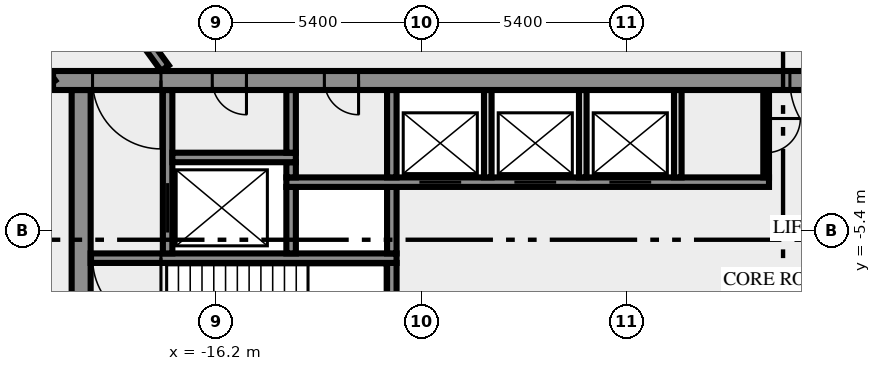
"""IFC4 building model, lengths in metres.
Left out: names, types, materials, properties, quantities, classifications, styles, units other than length and angle.
Written with IfcOpenShell. Run it as: python <this file> out.ifc"""

import sys

from ifc_helpers import new_model, si_unit, direction, frame, frame_2d, origin, place, context, subcontext, project, spatial, rectangle, extrude, element, fill, save


model = new_model("IFC4")
c1 = context("Model", 3, precision=1e-05, world=origin(), true_north=direction((0.0, 1.0)))
c2 = subcontext(c1, "Body", "Model", "MODEL_VIEW")
j1 = project(units=[si_unit("LENGTHUNIT", "METRE"), si_unit("PLANEANGLEUNIT", "RADIAN")], contexts=[c1])
p1 = place(None, origin())
s1 = spatial("IfcSite", under=j1, at=p1, CompositionType="ELEMENT")
p2 = place(p1, origin())
s2 = spatial("IfcBuilding", under=s1, at=p2, CompositionType="ELEMENT")
p3 = place(p2, frame((0.0, 0.0, 121.0)))
s3 = spatial("IfcBuildingStorey", under=s2, at=p3, CompositionType="ELEMENT", Elevation=121.0)
p4 = place(p3, frame((-19.75, -10.5, 0.0), z_axis=(0.0, 0.0, 1.0), x_axis=(0.0, 1.0, 0.0)))
e1 = element("IfcWall", 1, at=p4, inside=s3, PredefinedType="SHEAR", context=c2, shape_type="SweptSolid", body=[
    extrude(rectangle(XDim=8.8, YDim=0.5, at=frame_2d((4.4, 0.0))), origin(), (0.0, 0.0, 1.0), 3.65),
])
p5 = place(p3, frame((-11.575, -7.25, 0.0), z_axis=(0.0, 0.0, 1.0), x_axis=(0.0, 1.0, 0.0)))
e2 = element("IfcWall", 2, at=p5, inside=s3, PredefinedType="SHEAR", context=c2, shape_type="SweptSolid", body=[
    extrude(rectangle(XDim=1.0, YDim=0.25, at=frame_2d((0.5, 0.0))), origin(), (0.0, 0.0, 1.0), 3.65),
])
p6 = place(p3, frame((-11.45, -6.125, 0.0), z_axis=(0.0, 0.0, 1.0), x_axis=(-1.0, 0.0, 0.0)))
e3 = element("IfcWall", 3, at=p6, inside=s3, PredefinedType="SHEAR", context=c2, shape_type="SweptSolid", body=[
    extrude(rectangle(XDim=8.05, YDim=0.25, at=frame_2d((4.025, 0.0))), origin(), (0.0, 0.0, 1.0), 3.65),
])
p7 = place(p6, frame((6.2, 0.0, 0.0)))
e4 = element("IfcOpeningElement", 4, at=p7, cuts=e3, PredefinedType="OPENING", context=c2, shape_type="SweptSolid", body=[
    extrude(rectangle(XDim=1.8, YDim=2.1, at=frame_2d((0.9, 1.05))), frame((0.0, 0.135, 0.0), z_axis=(0.0, -1.0, 0.0), x_axis=(1.0, 0.0, 0.0)), (0.0, 0.0, 1.0), 0.27),
])
p8 = place(p3, frame((-17.475, -6.0, 0.0), z_axis=(0.0, 0.0, 1.0), x_axis=(0.0, 1.0, 0.0)))
e5 = element("IfcWall", 5, at=p8, inside=s3, PredefinedType="SHEAR", context=c2, shape_type="SweptSolid", body=[
    extrude(rectangle(XDim=4.3, YDim=0.25, at=frame_2d((2.15, 0.0))), origin(), (0.0, 0.0, 1.0), 3.65),
])
p9 = place(p8, frame((0.55, 0.0, 0.0)))
e6 = element("IfcOpeningElement", 6, at=p9, cuts=e5, PredefinedType="OPENING", context=c2, shape_type="SweptSolid", body=[
    extrude(rectangle(XDim=1.3, YDim=2.1, at=frame_2d((0.65, 1.05))), frame((0.0, 0.135, 0.0), z_axis=(0.0, -1.0, 0.0), x_axis=(1.0, 0.0, 0.0)), (0.0, 0.0, 1.0), 0.27),
])
for number, where, z_axis, x_axis in (
    (7, (-14.225, -6.0, 0.0), (0.0, 0.0, 1.0), (0.0, 1.0, 0.0)),
    (8, (-11.575, -6.0, 0.0), (0.0, 0.0, 1.0), (0.0, 1.0, 0.0)),
):
    element("IfcWall", number, at=place(p3, frame(where, z_axis=z_axis, x_axis=x_axis)), inside=s3, PredefinedType="SHEAR", context=c2, shape_type="SweptSolid", body=[
        extrude(rectangle(XDim=1.75, YDim=0.25, at=frame_2d((0.875, 0.0))), origin(), (0.0, 0.0, 1.0), 3.65),
    ])
p10 = place(p3, frame((-14.35, -4.125, 0.0), z_axis=(0.0, 0.0, 1.0), x_axis=(1.0, 0.0, 0.0)))
e9 = element("IfcWall", 9, at=p10, inside=s3, PredefinedType="SHEAR", context=c2, shape_type="SweptSolid", body=[
    extrude(rectangle(XDim=12.7, YDim=0.25, at=frame_2d((6.35, 0.0))), origin(), (0.0, 0.0, 1.0), 3.65),
])
p11 = place(p10, frame((3.5, 0.0, 0.0)))
e10 = element("IfcOpeningElement", 10, at=p11, cuts=e9, PredefinedType="OPENING", context=c2, shape_type="SweptSolid", body=[
    extrude(rectangle(XDim=1.1, YDim=2.1, at=frame_2d((0.55, 1.05))), frame((0.0, 0.135, 0.0), z_axis=(0.0, -1.0, 0.0), x_axis=(1.0, 0.0, 0.0)), (0.0, 0.0, 1.0), 0.27),
])
p12 = place(p10, frame((6.0, 0.0, 0.0)))
e11 = element("IfcOpeningElement", 11, at=p12, cuts=e9, PredefinedType="OPENING", context=c2, shape_type="SweptSolid", body=[
    extrude(rectangle(XDim=1.1, YDim=2.1, at=frame_2d((0.55, 1.05))), frame((0.0, 0.135, 0.0), z_axis=(0.0, -1.0, 0.0), x_axis=(1.0, 0.0, 0.0)), (0.0, 0.0, 1.0), 0.27),
])
p13 = place(p10, frame((8.5, 0.0, 0.0)))
e12 = element("IfcOpeningElement", 12, at=p13, cuts=e9, PredefinedType="OPENING", context=c2, shape_type="SweptSolid", body=[
    extrude(rectangle(XDim=1.1, YDim=2.1, at=frame_2d((0.55, 1.05))), frame((0.0, 0.135, 0.0), z_axis=(0.0, -1.0, 0.0), x_axis=(1.0, 0.0, 0.0)), (0.0, 0.0, 1.0), 0.27),
])
p14 = place(p3, frame((-14.225, -4.0, 0.0), z_axis=(0.0, 0.0, 1.0), x_axis=(0.0, 1.0, 0.0)))
e13 = element("IfcWall", 13, at=p14, inside=s3, PredefinedType="SHEAR", context=c2, shape_type="SweptSolid", body=[
    extrude(rectangle(XDim=0.4, YDim=0.25, at=frame_2d((0.2, 0.0))), origin(), (0.0, 0.0, 1.0), 3.65),
])
p15 = place(p3, frame((-11.575, -4.0, 0.0), z_axis=(0.0, 0.0, 1.0), x_axis=(0.0, 1.0, 0.0)))
e14 = element("IfcWall", 14, at=p15, inside=s3, PredefinedType="SHEAR", context=c2, shape_type="SweptSolid", body=[
    extrude(rectangle(XDim=2.3, YDim=0.25, at=frame_2d((1.15, 0.0))), origin(), (0.0, 0.0, 1.0), 3.65),
])
for number, where, z_axis, x_axis in (
    (15, (-9.05, -4.0, 0.0), (0.0, 0.0, 1.0), (0.0, 1.0, 0.0)),
    (16, (-6.55, -4.0, 0.0), (0.0, 0.0, 1.0), (0.0, 1.0, 0.0)),
    (17, (-4.05, -4.0, 0.0), (0.0, 0.0, 1.0), (0.0, 1.0, 0.0)),
):
    element("IfcWall", number, at=place(p3, frame(where, z_axis=z_axis, x_axis=x_axis)), inside=s3, PredefinedType="SOLIDWALL", context=c2, shape_type="SweptSolid", body=[
        extrude(rectangle(XDim=2.3, YDim=0.2, at=frame_2d((1.15, 0.0))), origin(), (0.0, 0.0, 1.0), 3.65),
    ])
p16 = place(p3, frame((-1.725, -1.7, 0.0), z_axis=(0.0, 0.0, 1.0), x_axis=(0.0, -1.0, 0.0)))
e18 = element("IfcWall", 18, at=p16, inside=s3, PredefinedType="PARTITIONING", context=c2, shape_type="SweptSolid", body=[
    extrude(rectangle(XDim=2.3, YDim=0.15, at=frame_2d((1.15, 0.0))), origin(), (0.0, 0.0, 1.0), 3.65),
])
p17 = place(p16, frame((0.75, 0.0, 0.0)))
e19 = element("IfcOpeningElement", 19, at=p17, cuts=e18, PredefinedType="OPENING", context=c2, shape_type="SweptSolid", body=[
    extrude(rectangle(XDim=0.9, YDim=2.1, at=frame_2d((0.45, 1.05))), frame((0.0, 0.085, 0.0), z_axis=(0.0, -1.0, 0.0), x_axis=(1.0, 0.0, 0.0)), (0.0, 0.0, 1.0), 0.17),
])
p18 = place(p3, frame((-17.35, -3.475, 0.0), z_axis=(0.0, 0.0, 1.0), x_axis=(1.0, 0.0, 0.0)))
e20 = element("IfcWall", 20, at=p18, inside=s3, PredefinedType="SHEAR", context=c2, shape_type="SweptSolid", body=[
    extrude(rectangle(XDim=3.25, YDim=0.25, at=frame_2d((1.625, 0.0))), origin(), (0.0, 0.0, 1.0), 3.65),
])
p19 = place(p3, frame((-14.225, -3.35, 0.0), z_axis=(0.0, 0.0, 1.0), x_axis=(0.0, 1.0, 0.0)))
e21 = element("IfcWall", 21, at=p19, inside=s3, PredefinedType="SHEAR", context=c2, shape_type="SweptSolid", body=[
    extrude(rectangle(XDim=1.65, YDim=0.25, at=frame_2d((0.825, 0.0))), origin(), (0.0, 0.0, 1.0), 3.65),
])
p20 = place(p3, frame((20.49, -1.45, 0.0), z_axis=(0.0, 0.0, 1.0), x_axis=(-1.0, 0.0, 0.0)))
e22 = element("IfcWall", 22, at=p20, inside=s3, PredefinedType="SHEAR", context=c2, shape_type="SweptSolid", body=[
    extrude(rectangle(XDim=40.98, YDim=0.5, at=frame_2d((20.49, 0.0))), origin(), (0.0, 0.0, 1.0), 3.65),
])
p21 = place(p20, frame((38.14, 0.0, 0.0)))
e23 = element("IfcOpeningElement", 23, at=p21, cuts=e22, PredefinedType="OPENING", context=c2, shape_type="SweptSolid", body=[
    extrude(rectangle(XDim=1.8, YDim=2.1, at=frame_2d((0.9, 1.05))), frame((0.0, 0.26, 0.0), z_axis=(0.0, -1.0, 0.0), x_axis=(1.0, 0.0, 0.0)), (0.0, 0.0, 1.0), 0.52),
])
p22 = place(p20, frame((35.89, 0.0, 0.0)))
e24 = element("IfcOpeningElement", 24, at=p22, cuts=e22, PredefinedType="OPENING", context=c2, shape_type="SweptSolid", body=[
    extrude(rectangle(XDim=0.9, YDim=2.1, at=frame_2d((0.45, 1.05))), frame((0.0, 0.26, 0.0), z_axis=(0.0, -1.0, 0.0), x_axis=(1.0, 0.0, 0.0)), (0.0, 0.0, 1.0), 0.52),
])
p23 = place(p20, frame((32.94, 0.0, 0.0)))
e25 = element("IfcOpeningElement", 25, at=p23, cuts=e22, PredefinedType="OPENING", context=c2, shape_type="SweptSolid", body=[
    extrude(rectangle(XDim=0.9, YDim=2.1, at=frame_2d((0.45, 1.05))), frame((0.0, 0.26, 0.0), z_axis=(0.0, -1.0, 0.0), x_axis=(1.0, 0.0, 0.0)), (0.0, 0.0, 1.0), 0.52),
])
p24 = place(p20, frame((19.59, 0.0, 0.0)))
e26 = element("IfcOpeningElement", 26, at=p24, cuts=e22, PredefinedType="OPENING", context=c2, shape_type="SweptSolid", body=[
    extrude(rectangle(XDim=2.0, YDim=2.1, at=frame_2d((1.0, 1.05))), frame((0.0, 0.26, 0.0), z_axis=(0.0, -1.0, 0.0), x_axis=(1.0, 0.0, 0.0)), (0.0, 0.0, 1.0), 0.52),
])
p25 = place(p20, frame((7.14, 0.0, 0.0)))
e27 = element("IfcOpeningElement", 27, at=p25, cuts=e22, PredefinedType="OPENING", context=c2, shape_type="SweptSolid", body=[
    extrude(rectangle(XDim=0.9, YDim=2.1, at=frame_2d((0.45, 1.05))), frame((0.0, 0.26, 0.0), z_axis=(0.0, -1.0, 0.0), x_axis=(1.0, 0.0, 0.0)), (0.0, 0.0, 1.0), 0.52),
])
p26 = place(p20, frame((5.028, 0.0, 0.0)))
e28 = element("IfcOpeningElement", 28, at=p26, cuts=e22, PredefinedType="OPENING", context=c2, shape_type="SweptSolid", body=[
    extrude(rectangle(XDim=0.8, YDim=2.1, at=frame_2d((0.4, 1.05))), frame((0.0, 0.26, 0.0), z_axis=(0.0, -1.0, 0.0), x_axis=(1.0, 0.0, 0.0)), (0.0, 0.0, 1.0), 0.52),
])
p27 = place(p20, frame((3.452, 0.0, 0.0)))
e29 = element("IfcOpeningElement", 29, at=p27, cuts=e22, PredefinedType="OPENING", context=c2, shape_type="SweptSolid", body=[
    extrude(rectangle(XDim=0.8, YDim=2.1, at=frame_2d((0.4, 1.05))), frame((0.0, 0.26, 0.0), z_axis=(0.0, -1.0, 0.0), x_axis=(1.0, 0.0, 0.0)), (0.0, 0.0, 1.0), 0.52),
])
p28 = place(p20, frame((1.04, 0.0, 0.0)))
e30 = element("IfcOpeningElement", 30, at=p28, cuts=e22, PredefinedType="OPENING", context=c2, shape_type="SweptSolid", body=[
    extrude(rectangle(XDim=1.8, YDim=2.1, at=frame_2d((0.9, 1.05))), frame((0.0, 0.26, 0.0), z_axis=(0.0, -1.0, 0.0), x_axis=(1.0, 0.0, 0.0)), (0.0, 0.0, 1.0), 0.52),
])
p29 = place(p3, frame((-20.531, -1.523, 0.0), z_axis=(0.0, 0.0, 1.0), x_axis=(-0.587784522481, 0.809017524614, 0.0)))
e31 = element("IfcWall", 31, at=p29, inside=s3, PredefinedType="SOLIDWALL", context=c2, shape_type="SweptSolid", body=[
    extrude(rectangle(XDim=49.912, YDim=0.25, at=frame_2d((24.956, 0.0))), origin(), (0.0, 0.0, 1.0), 3.65),
])
p30 = place(p29, frame((34.816, 0.0, 0.0)))
e32 = element("IfcOpeningElement", 32, at=p30, cuts=e31, PredefinedType="OPENING", context=c2, shape_type="SweptSolid", body=[
    extrude(rectangle(XDim=0.9, YDim=2.1, at=frame_2d((0.45, 1.05))), frame((0.0, 0.135, 0.0), z_axis=(0.0, -1.0, 0.0), x_axis=(1.0, 0.0, 0.0)), (0.0, 0.0, 1.0), 0.27),
])
p31 = place(p29, frame((33.215, 0.0, 0.0)))
e33 = element("IfcOpeningElement", 33, at=p31, cuts=e31, PredefinedType="OPENING", context=c2, shape_type="SweptSolid", body=[
    extrude(rectangle(XDim=0.9, YDim=2.1, at=frame_2d((0.45, 1.05))), frame((0.0, 0.135, 0.0), z_axis=(0.0, -1.0, 0.0), x_axis=(1.0, 0.0, 0.0)), (0.0, 0.0, 1.0), 0.27),
])
p32 = place(p29, frame((22.916, 0.0, 0.0)))
e34 = element("IfcOpeningElement", 34, at=p32, cuts=e31, PredefinedType="OPENING", context=c2, shape_type="SweptSolid", body=[
    extrude(rectangle(XDim=1.8, YDim=2.1, at=frame_2d((0.9, 1.05))), frame((0.0, 0.135, 0.0), z_axis=(0.0, -1.0, 0.0), x_axis=(1.0, 0.0, 0.0)), (0.0, 0.0, 1.0), 0.27),
])
p33 = place(p29, frame((0.483, 0.0, 0.0)))
e35 = element("IfcOpeningElement", 35, at=p33, cuts=e31, PredefinedType="OPENING", context=c2, shape_type="SweptSolid", body=[
    extrude(rectangle(XDim=1.8, YDim=2.1, at=frame_2d((0.9, 1.05))), frame((0.0, 0.135, 0.0), z_axis=(0.0, -1.0, 0.0), x_axis=(1.0, 0.0, 0.0)), (0.0, 0.0, 1.0), 0.27),
])
p34 = place(p29, frame((25.365, 0.0, 0.0)))
e36 = element("IfcOpeningElement", 36, at=p34, cuts=e31, PredefinedType="OPENING", context=c2, shape_type="SweptSolid", body=[
    extrude(rectangle(XDim=0.9, YDim=2.1, at=frame_2d((0.45, 1.05))), frame((0.0, 0.135, 0.0), z_axis=(0.0, -1.0, 0.0), x_axis=(1.0, 0.0, 0.0)), (0.0, 0.0, 1.0), 0.27),
])
p35 = place(p3, frame((-37.232, 25.972, 0.0), z_axis=(0.0, 0.0, 1.0), x_axis=(0.587786323093, -0.809016216391, 0.0)))
e37 = element("IfcWall", 37, at=p35, inside=s3, PredefinedType="SOLIDWALL", context=c2, shape_type="SweptSolid", body=[
    extrude(rectangle(XDim=33.493, YDim=0.25, at=frame_2d((16.747, 0.0))), origin(), (0.0, 0.0, 1.0), 3.65),
])
p36 = place(p35, frame((9.785, 0.0, 0.0)))
e38 = element("IfcOpeningElement", 38, at=p36, cuts=e37, PredefinedType="OPENING", context=c2, shape_type="SweptSolid", body=[
    extrude(rectangle(XDim=1.8, YDim=2.1, at=frame_2d((0.9, 1.05))), frame((0.0, 0.135, 0.0), z_axis=(0.0, -1.0, 0.0), x_axis=(1.0, 0.0, 0.0)), (0.0, 0.0, 1.0), 0.27),
])
p37 = place(p35, frame((29.152, 0.0, 0.0)))
e39 = element("IfcOpeningElement", 39, at=p37, cuts=e37, PredefinedType="OPENING", context=c2, shape_type="SweptSolid", body=[
    extrude(rectangle(XDim=0.9, YDim=2.1, at=frame_2d((0.45, 1.05))), frame((0.0, 0.135, 0.0), z_axis=(0.0, -1.0, 0.0), x_axis=(1.0, 0.0, 0.0)), (0.0, 0.0, 1.0), 0.27),
])
p38 = place(p35, frame((1.335, 0.0, 0.0)))
e40 = element("IfcOpeningElement", 40, at=p38, cuts=e37, PredefinedType="OPENING", context=c2, shape_type="SweptSolid", body=[
    extrude(rectangle(XDim=0.9, YDim=2.1, at=frame_2d((0.45, 1.05))), frame((0.0, 0.135, 0.0), z_axis=(0.0, -1.0, 0.0), x_axis=(1.0, 0.0, 0.0)), (0.0, 0.0, 1.0), 0.27),
])
p39 = place(p7, origin())
e41 = element("IfcDoor", 41, at=p39, inside=s3, OperationType="DOUBLE_DOOR_SINGLE_SWING", PredefinedType="DOOR", context=c2, shape_type="SweptSolid", body=[
    extrude(rectangle(XDim=1.8, YDim=2.1, at=frame_2d((0.9, 1.05))), frame((0.0, 0.025, 0.0), z_axis=(0.0, -1.0, 0.0), x_axis=(1.0, 0.0, 0.0)), (0.0, 0.0, 1.0), 0.05),
])
fill(e4, e41)
p40 = place(p9, origin())
e42 = element("IfcDoor", 42, at=p40, inside=s3, OperationType="DOUBLE_DOOR_SLIDING", PredefinedType="DOOR", context=c2, shape_type="SweptSolid", body=[
    extrude(rectangle(XDim=1.3, YDim=2.1, at=frame_2d((0.65, 1.05))), frame((0.0, 0.025, 0.0), z_axis=(0.0, -1.0, 0.0), x_axis=(1.0, 0.0, 0.0)), (0.0, 0.0, 1.0), 0.05),
])
fill(e6, e42)
p41 = place(p11, origin())
e43 = element("IfcDoor", 43, at=p41, inside=s3, OperationType="DOUBLE_DOOR_SLIDING", PredefinedType="DOOR", context=c2, shape_type="SweptSolid", body=[
    extrude(rectangle(XDim=1.1, YDim=2.1, at=frame_2d((0.55, 1.05))), frame((0.0, 0.025, 0.0), z_axis=(0.0, -1.0, 0.0), x_axis=(1.0, 0.0, 0.0)), (0.0, 0.0, 1.0), 0.05),
])
fill(e10, e43)
p42 = place(p12, origin())
e44 = element("IfcDoor", 44, at=p42, inside=s3, OperationType="DOUBLE_DOOR_SLIDING", PredefinedType="DOOR", context=c2, shape_type="SweptSolid", body=[
    extrude(rectangle(XDim=1.1, YDim=2.1, at=frame_2d((0.55, 1.05))), frame((0.0, 0.025, 0.0), z_axis=(0.0, -1.0, 0.0), x_axis=(1.0, 0.0, 0.0)), (0.0, 0.0, 1.0), 0.05),
])
fill(e11, e44)
p43 = place(p13, origin())
e45 = element("IfcDoor", 45, at=p43, inside=s3, OperationType="DOUBLE_DOOR_SLIDING", PredefinedType="DOOR", context=c2, shape_type="SweptSolid", body=[
    extrude(rectangle(XDim=1.1, YDim=2.1, at=frame_2d((0.55, 1.05))), frame((0.0, 0.025, 0.0), z_axis=(0.0, -1.0, 0.0), x_axis=(1.0, 0.0, 0.0)), (0.0, 0.0, 1.0), 0.05),
])
fill(e12, e45)
p44 = place(p17, origin())
e46 = element("IfcDoor", 46, at=p44, inside=s3, OperationType="SINGLE_SWING_RIGHT", PredefinedType="DOOR", context=c2, shape_type="SweptSolid", body=[
    extrude(rectangle(XDim=0.9, YDim=2.1, at=frame_2d((0.45, 1.05))), frame((0.0, 0.025, 0.0), z_axis=(0.0, -1.0, 0.0), x_axis=(1.0, 0.0, 0.0)), (0.0, 0.0, 1.0), 0.05),
])
fill(e19, e46)
p45 = place(p21, origin())
e47 = element("IfcDoor", 47, at=p45, inside=s3, OperationType="DOUBLE_DOOR_SINGLE_SWING", PredefinedType="DOOR", context=c2, shape_type="SweptSolid", body=[
    extrude(rectangle(XDim=1.8, YDim=2.1, at=frame_2d((0.9, 1.05))), frame((0.0, 0.025, 0.0), z_axis=(0.0, -1.0, 0.0), x_axis=(1.0, 0.0, 0.0)), (0.0, 0.0, 1.0), 0.05),
])
fill(e23, e47)
p46 = place(p22, origin())
e48 = element("IfcDoor", 48, at=p46, inside=s3, OperationType="SINGLE_SWING_RIGHT", PredefinedType="DOOR", context=c2, shape_type="SweptSolid", body=[
    extrude(rectangle(XDim=0.9, YDim=2.1, at=frame_2d((0.45, 1.05))), frame((0.0, 0.025, 0.0), z_axis=(0.0, -1.0, 0.0), x_axis=(1.0, 0.0, 0.0)), (0.0, 0.0, 1.0), 0.05),
])
fill(e24, e48)
p47 = place(p23, origin())
e49 = element("IfcDoor", 49, at=p47, inside=s3, OperationType="SINGLE_SWING_RIGHT", PredefinedType="DOOR", context=c2, shape_type="SweptSolid", body=[
    extrude(rectangle(XDim=0.9, YDim=2.1, at=frame_2d((0.45, 1.05))), frame((0.0, 0.025, 0.0), z_axis=(0.0, -1.0, 0.0), x_axis=(1.0, 0.0, 0.0)), (0.0, 0.0, 1.0), 0.05),
])
fill(e25, e49)
p48 = place(p24, origin())
e50 = element("IfcDoor", 50, at=p48, inside=s3, OperationType="DOUBLE_DOOR_SINGLE_SWING", PredefinedType="DOOR", context=c2, shape_type="SweptSolid", body=[
    extrude(rectangle(XDim=2.0, YDim=2.1, at=frame_2d((1.0, 1.05))), frame((0.0, 0.025, 0.0), z_axis=(0.0, -1.0, 0.0), x_axis=(1.0, 0.0, 0.0)), (0.0, 0.0, 1.0), 0.05),
])
fill(e26, e50)
save(model, sys.argv[1])
